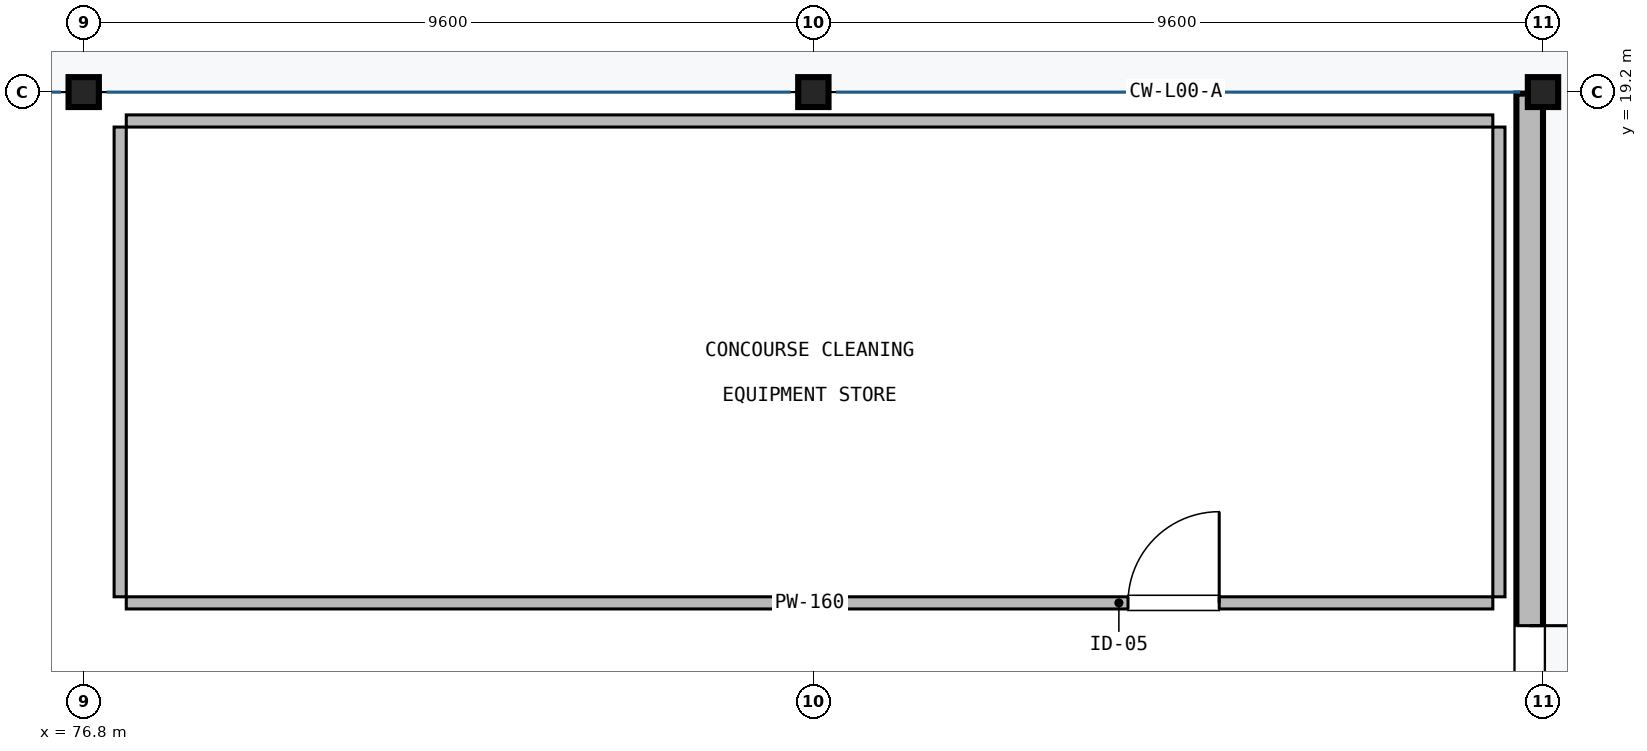
"""IFC4 building model, lengths in metres.
Left out: names, types, materials, properties, quantities, classifications, styles, units other than length and angle.
Written with IfcOpenShell. Run it as: python <this file> out.ifc"""

import sys

from ifc_helpers import new_model, si_unit, direction, frame, frame_2d, origin, origin_2d, place, context, subcontext, project, spatial, rectangle, i_section, extrude, element, fill, save


model = new_model("IFC4")
c1 = context("Model", 3, precision=1e-05, world=origin(), true_north=direction((0.0, 1.0)))
c2 = subcontext(c1, "Body", "Model", "MODEL_VIEW")
j1 = project(units=[si_unit("LENGTHUNIT", "METRE"), si_unit("PLANEANGLEUNIT", "RADIAN")], contexts=[c1])
p1 = place(None, origin())
s1 = spatial("IfcSite", under=j1, at=p1, CompositionType="ELEMENT")
p2 = place(p1, origin())
s2 = spatial("IfcBuilding", under=s1, at=p2, CompositionType="ELEMENT")
p3 = place(p2, origin())
s3 = spatial("IfcBuildingStorey", under=s2, at=p3, CompositionType="ELEMENT", Elevation=0.0)
for number, where, z_axis, x_axis in (
    (1, (76.8, 19.2, -0.36), (0.0, 0.0, 1.0), (1.0, 0.0, 0.0)),
    (2, (86.4, 19.2, -0.36), (0.0, 0.0, 1.0), (1.0, 0.0, 0.0)),
    (3, (96.0, 19.2, -0.36), (0.0, 0.0, 1.0), (1.0, 0.0, 0.0)),
):
    element("IfcColumn", number, at=place(p3, frame(where, z_axis=z_axis, x_axis=x_axis)), inside=s3, PredefinedType="COLUMN", context=c2, shape_type="SweptSolid", body=[
        extrude(i_section(OverallWidth=0.399, OverallDepth=0.394, WebThickness=0.023, FlangeThickness=0.037, FilletRadius=0.015, at=origin_2d()), origin(), (0.0, 0.0, 1.0), 6.11),
    ])
p4 = place(p3, frame((95.825, 19.18, 0.0), z_axis=(0.0, 0.0, 1.0), x_axis=(0.0, -1.0, 0.0)))
e4 = element("IfcWall", 4, at=p4, inside=s3, PredefinedType="SOLIDWALL", context=c2, shape_type="SweptSolid", body=[
    extrude(rectangle(XDim=9.56, YDim=0.35, at=frame_2d((4.78, 0.0))), origin(), (0.0, 0.0, 1.0), 5.217),
])
p5 = place(p4, frame((7.0, 0.0, 0.0)))
e5 = element("IfcOpeningElement", 5, at=p5, cuts=e4, PredefinedType="OPENING", context=c2, shape_type="SweptSolid", body=[
    extrude(rectangle(XDim=1.6, YDim=2.2, at=frame_2d((0.8, 1.1))), frame((0.0, 0.185, 0.0), z_axis=(0.0, -1.0, 0.0), x_axis=(1.0, 0.0, 0.0)), (0.0, 0.0, 1.0), 0.37),
])
p6 = place(p3, frame((95.34, 12.48, 0.0), z_axis=(0.0, 0.0, 1.0), x_axis=(-1.0, 0.0, 0.0)))
e6 = element("IfcWall", 6, at=p6, inside=s3, PredefinedType="PARTITIONING", context=c2, shape_type="SweptSolid", body=[
    extrude(rectangle(XDim=17.98, YDim=0.16, at=frame_2d((8.99, 0.0))), origin(), (0.0, 0.0, 1.0), 5.207),
])
p7 = place(p6, frame((3.6, 0.0, 0.0)))
e7 = element("IfcOpeningElement", 7, at=p7, cuts=e6, PredefinedType="OPENING", context=c2, shape_type="SweptSolid", body=[
    extrude(rectangle(XDim=1.2, YDim=2.2, at=frame_2d((0.6, 1.1))), frame((0.0, 0.09, 0.0), z_axis=(0.0, -1.0, 0.0), x_axis=(1.0, 0.0, 0.0)), (0.0, 0.0, 1.0), 0.18),
])
p8 = place(p3, frame((77.36, 18.82, 0.0), z_axis=(0.0, 0.0, 1.0), x_axis=(1.0, 0.0, 0.0)))
e8 = element("IfcWall", 8, at=p8, inside=s3, PredefinedType="PARTITIONING", context=c2, shape_type="SweptSolid", body=[
    extrude(rectangle(XDim=17.98, YDim=0.16, at=frame_2d((8.99, 0.0))), origin(), (0.0, 0.0, 1.0), 5.207),
])
for number, where, z_axis, x_axis in (
    (9, (77.28, 12.56, 0.0), (0.0, 0.0, 1.0), (0.0, 1.0, 0.0)),
    (10, (95.42, 18.74, 0.0), (0.0, 0.0, 1.0), (0.0, -1.0, 0.0)),
):
    element("IfcWall", number, at=place(p3, frame(where, z_axis=z_axis, x_axis=x_axis)), inside=s3, PredefinedType="PARTITIONING", context=c2, shape_type="SweptSolid", body=[
        extrude(rectangle(XDim=6.18, YDim=0.16, at=frame_2d((3.09, 0.0))), origin(), (0.0, 0.0, 1.0), 5.39),
    ])
p9 = place(p5, origin())
e11 = element("IfcDoor", 11, at=p9, inside=s3, OperationType="DOUBLE_DOOR_SINGLE_SWING", PredefinedType="DOOR", context=c2, shape_type="SweptSolid", body=[
    extrude(rectangle(XDim=1.6, YDim=2.2, at=frame_2d((0.8, 1.1))), frame((0.0, 0.025, 0.0), z_axis=(0.0, -1.0, 0.0), x_axis=(1.0, 0.0, 0.0)), (0.0, 0.0, 1.0), 0.05),
])
fill(e5, e11)
p10 = place(p7, frame((1.2, 0.0, 0.0), z_axis=(0.0, 0.0, 1.0), x_axis=(-1.0, 0.0, 0.0)))
e12 = element("IfcDoor", 12, at=p10, inside=s3, OperationType="SINGLE_SWING_LEFT", PredefinedType="DOOR", context=c2, shape_type="SweptSolid", body=[
    extrude(rectangle(XDim=1.2, YDim=2.2, at=frame_2d((0.6, 1.1))), frame((0.0, 0.025, 0.0), z_axis=(0.0, -1.0, 0.0), x_axis=(1.0, 0.0, 0.0)), (0.0, 0.0, 1.0), 0.05),
])
fill(e7, e12)
save(model, sys.argv[1])
